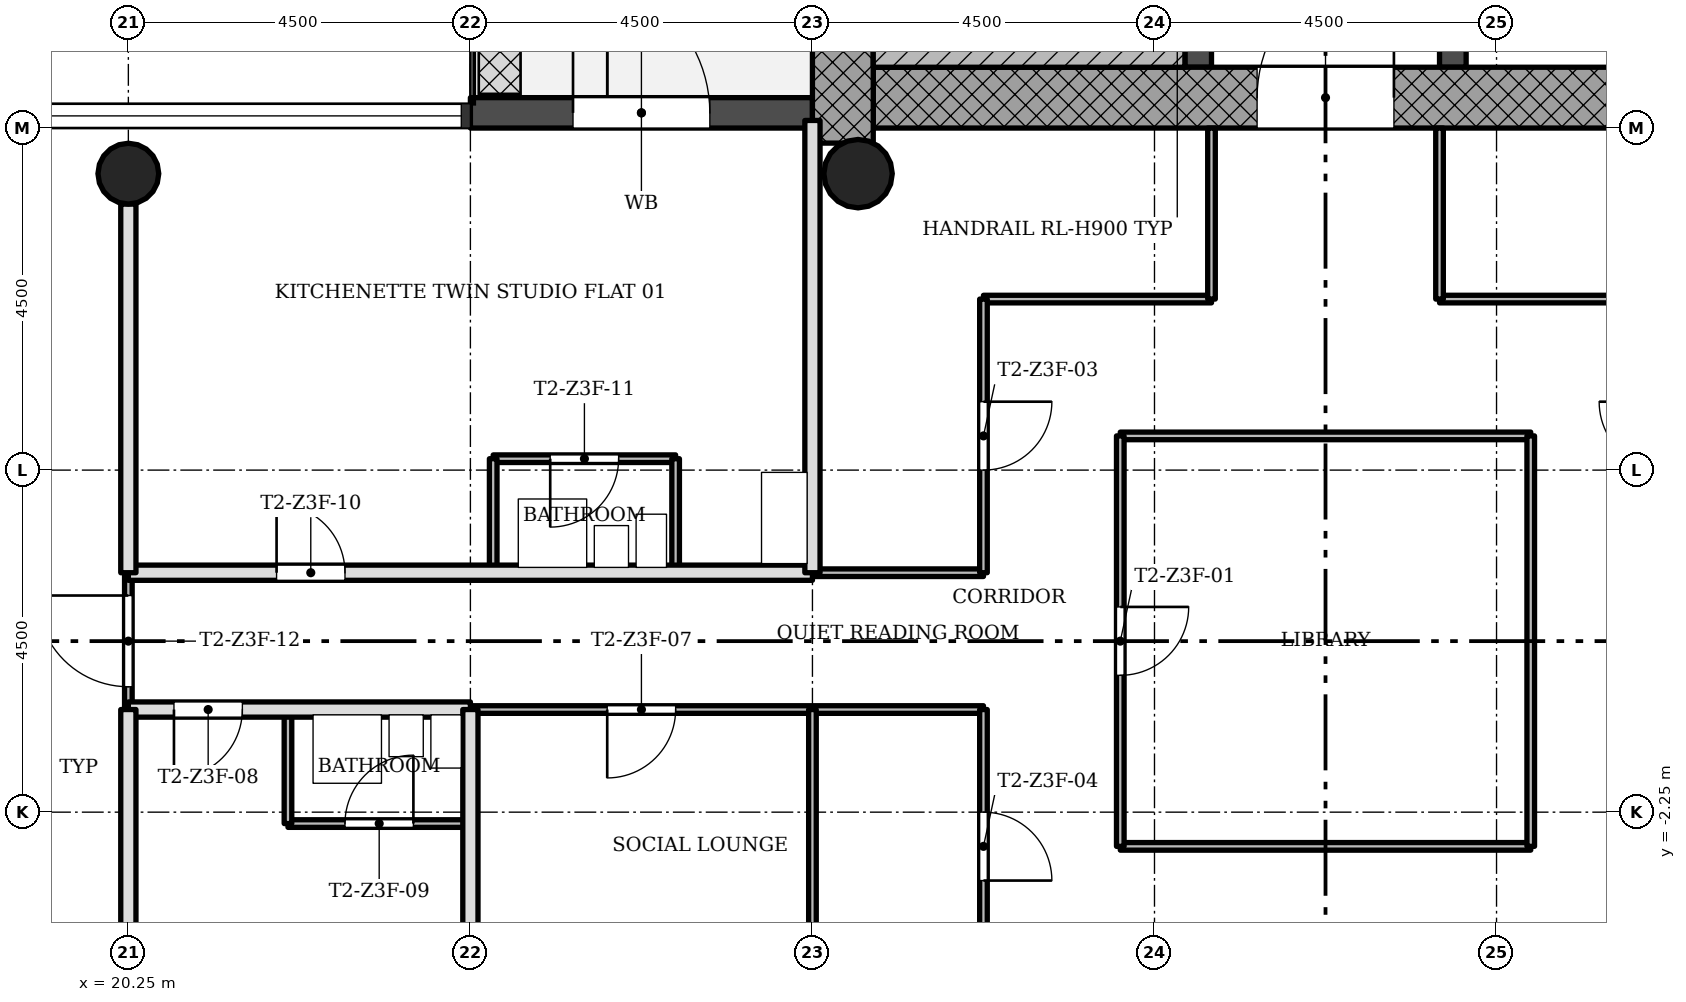
"""IFC4 building model, lengths in metres.
Left out: names, types, materials, properties, quantities, classifications, styles, units other than length and angle.
Written with IfcOpenShell. Run it as: python <this file> out.ifc"""

import sys

from ifc_helpers import new_model, si_unit, direction, frame, frame_2d, origin, origin_2d, place, context, subcontext, project, spatial, rectangle, hollow_circle, extrude, element, fill, save


model = new_model("IFC4")
c1 = context("Model", 3, precision=1e-05, world=origin(), true_north=direction((0.0, 1.0)))
c2 = subcontext(c1, "Body", "Model", "MODEL_VIEW")
j1 = project(units=[si_unit("LENGTHUNIT", "METRE"), si_unit("PLANEANGLEUNIT", "RADIAN")], contexts=[c1])
p1 = place(None, origin())
s1 = spatial("IfcSite", under=j1, at=p1, CompositionType="ELEMENT")
p2 = place(p1, origin())
s2 = spatial("IfcBuilding", under=s1, at=p2, CompositionType="ELEMENT")
p3 = place(p2, frame((0.0, 0.0, 167.7)))
s3 = spatial("IfcBuildingStorey", under=s2, at=p3, CompositionType="ELEMENT", Elevation=167.7)
p4 = place(p3, frame((30.05, 7.15, 0.0), z_axis=(0.0, 0.0, 1.0), x_axis=(1.0, 0.0, 0.0)))
e1 = element("IfcWall", 1, at=p4, inside=s3, PredefinedType="SHEAR", context=c2, shape_type="SweptSolid", body=[
    extrude(rectangle(XDim=12.7, YDim=0.8, at=frame_2d((6.35, 0.0))), origin(), (0.0, 0.0, 1.0), 3.4),
])
p5 = place(p4, frame((5.05, 0.0, 0.0)))
e2 = element("IfcOpeningElement", 2, at=p5, cuts=e1, PredefinedType="OPENING", context=c2, shape_type="SweptSolid", body=[
    extrude(rectangle(XDim=1.8, YDim=2.1, at=frame_2d((0.9, 1.05))), frame((0.0, 0.41, 0.0), z_axis=(0.0, -1.0, 0.0), x_axis=(1.0, 0.0, 0.0)), (0.0, 0.0, 1.0), 0.82),
])
p6 = place(p3, frame((29.65, 15.348, 0.0), z_axis=(0.0, 0.0, 1.0), x_axis=(0.0, -1.0, 0.0)))
e3 = element("IfcWall", 3, at=p6, inside=s3, PredefinedType="SHEAR", context=c2, shape_type="SweptSolid", body=[
    extrude(rectangle(XDim=8.796, YDim=0.8, at=frame_2d((4.398, 0.0))), origin(), (0.0, 0.0, 1.0), 3.4),
])
p7 = place(p3, frame((34.325, 7.55, 0.0), z_axis=(0.0, 0.0, 1.0), x_axis=(0.0, 1.0, 0.0)))
e4 = element("IfcWall", 4, at=p7, inside=s3, PredefinedType="SHEAR", context=c2, shape_type="SweptSolid", body=[
    extrude(rectangle(XDim=7.4, YDim=0.35, at=frame_2d((3.7, 0.0))), origin(), (0.0, 0.0, 1.0), 3.4),
])
p8 = place(p7, frame((0.85, 0.0, 0.0)))
e5 = element("IfcOpeningElement", 5, at=p8, cuts=e4, PredefinedType="OPENING", context=c2, shape_type="SweptSolid", body=[
    extrude(rectangle(XDim=0.9, YDim=2.1, at=frame_2d((0.45, 1.05))), frame((0.0, 0.185, 0.0), z_axis=(0.0, -1.0, 0.0), x_axis=(1.0, 0.0, 0.0)), (0.0, 0.0, 1.0), 0.37),
])
p9 = place(p3, frame((37.675, 7.55, 0.0), z_axis=(0.0, 0.0, 1.0), x_axis=(0.0, 1.0, 0.0)))
e6 = element("IfcWall", 6, at=p9, inside=s3, PredefinedType="SHEAR", context=c2, shape_type="SweptSolid", body=[
    extrude(rectangle(XDim=7.4, YDim=0.35, at=frame_2d((3.7, 0.0))), origin(), (0.0, 0.0, 1.0), 3.4),
])
p10 = place(p9, frame((0.95, 0.0, 0.0)))
e7 = element("IfcOpeningElement", 7, at=p10, cuts=e6, PredefinedType="OPENING", context=c2, shape_type="SweptSolid", body=[
    extrude(rectangle(XDim=1.1, YDim=2.1, at=frame_2d((0.55, 1.05))), frame((0.0, 0.185, 0.0), z_axis=(0.0, -1.0, 0.0), x_axis=(1.0, 0.0, 0.0)), (0.0, 0.0, 1.0), 0.37),
])
p11 = place(p9, frame((3.15, 0.0, 0.0)))
e8 = element("IfcOpeningElement", 8, at=p11, cuts=e6, PredefinedType="OPENING", context=c2, shape_type="SweptSolid", body=[
    extrude(rectangle(XDim=1.1, YDim=2.1, at=frame_2d((0.55, 1.05))), frame((0.0, 0.185, 0.0), z_axis=(0.0, -1.0, 0.0), x_axis=(1.0, 0.0, 0.0)), (0.0, 0.0, 1.0), 0.37),
])
p12 = place(p9, frame((5.35, 0.0, 0.0)))
e9 = element("IfcOpeningElement", 9, at=p12, cuts=e6, PredefinedType="OPENING", context=c2, shape_type="SweptSolid", body=[
    extrude(rectangle(XDim=1.1, YDim=2.1, at=frame_2d((0.55, 1.05))), frame((0.0, 0.185, 0.0), z_axis=(0.0, -1.0, 0.0), x_axis=(1.0, 0.0, 0.0)), (0.0, 0.0, 1.0), 0.37),
])
p13 = place(p3, frame((20.25, 6.15, 0.0), z_axis=(0.0, 0.0, 1.0), x_axis=(1.0, 0.0, 0.0)))
e10 = element("IfcColumn", 10, at=p13, inside=s3, PredefinedType="COLUMN", context=c2, shape_type="SweptSolid", body=[
    extrude(hollow_circle(Radius=0.4, WallThickness=0.028, at=origin_2d()), origin(), (0.0, 0.0, 1.0), 3.4),
])
p14 = place(p3, frame((29.85, 6.15, 0.0), z_axis=(0.0, 0.0, 1.0), x_axis=(1.0, 0.0, 0.0)))
e11 = element("IfcColumn", 11, at=p14, inside=s3, PredefinedType="COLUMN", context=c2, shape_type="SweptSolid", body=[
    extrude(hollow_circle(Radius=0.45, WallThickness=0.032, at=origin_2d()), origin(), (0.0, 0.0, 1.0), 3.4),
])
p15 = place(p3, frame((29.25, 6.95, -0.02), z_axis=(0.0, 0.0, 1.0), x_axis=(-1.0, 0.0, 0.0)))
e12 = element("IfcWall", 12, at=p15, inside=s3, PredefinedType="STANDARD", context=c2, shape_type="SweptSolid", body=[
    extrude(rectangle(XDim=4.5, YDim=0.4, at=frame_2d((2.25, 0.0))), origin(), (0.0, 0.0, 1.0), 3.12),
])
p16 = place(p15, frame((1.35, 0.0, 0.02)))
e13 = element("IfcOpeningElement", 13, at=p16, cuts=e12, PredefinedType="OPENING", context=c2, shape_type="SweptSolid", body=[
    extrude(rectangle(XDim=1.8, YDim=2.1, at=frame_2d((0.9, 1.05))), frame((0.0, 0.21, 0.0), z_axis=(0.0, -1.0, 0.0), x_axis=(1.0, 0.0, 0.0)), (0.0, 0.0, 1.0), 0.42),
])
p17 = place(p3, frame((38.7, -2.7, 0.0), z_axis=(0.0, 0.0, 1.0), x_axis=(-1.0, 0.0, 0.0)))
e14 = element("IfcWall", 14, at=p17, inside=s3, PredefinedType="PARTITIONING", context=c2, shape_type="SweptSolid", body=[
    extrude(rectangle(XDim=5.4, YDim=0.1, at=frame_2d((2.7, 0.0))), origin(), (0.0, 0.0, 1.0), 3.0),
])
p18 = place(p3, frame((24.75, -2.4, 0.0), z_axis=(0.0, 0.0, 1.0), x_axis=(-1.0, 0.0, 0.0)))
e15 = element("IfcWall", 15, at=p18, inside=s3, PredefinedType="PARTITIONING", context=c2, shape_type="SweptSolid", body=[
    extrude(rectangle(XDim=2.4, YDim=0.1, at=frame_2d((1.2, 0.0))), origin(), (0.0, 0.0, 1.0), 3.0),
])
p19 = place(p18, frame((0.75, 0.0, 0.0)))
e16 = element("IfcOpeningElement", 16, at=p19, cuts=e15, PredefinedType="OPENING", context=c2, shape_type="SweptSolid", body=[
    extrude(rectangle(XDim=0.9, YDim=2.1, at=frame_2d((0.45, 1.05))), frame((0.0, 0.06, 0.0), z_axis=(0.0, -1.0, 0.0), x_axis=(1.0, 0.0, 0.0)), (0.0, 0.0, 1.0), 0.12),
])
p20 = place(p3, frame((31.5, -0.9, 0.0), z_axis=(0.0, 0.0, 1.0), x_axis=(-1.0, 0.0, 0.0)))
e17 = element("IfcWall", 17, at=p20, inside=s3, PredefinedType="PARTITIONING", context=c2, shape_type="SweptSolid", body=[
    extrude(rectangle(XDim=6.75, YDim=0.1, at=frame_2d((3.375, 0.0))), origin(), (0.0, 0.0, 1.0), 3.0),
])
p21 = place(p20, frame((4.05, 0.0, 0.0)))
e18 = element("IfcOpeningElement", 18, at=p21, cuts=e17, PredefinedType="OPENING", context=c2, shape_type="SweptSolid", body=[
    extrude(rectangle(XDim=0.9, YDim=2.1, at=frame_2d((0.45, 1.05))), frame((0.0, 0.06, 0.0), z_axis=(0.0, -1.0, 0.0), x_axis=(1.0, 0.0, 0.0)), (0.0, 0.0, 1.0), 0.12),
])
p22 = place(p3, frame((24.75, -0.9, 0.0), z_axis=(0.0, 0.0, 1.0), x_axis=(-1.0, 0.0, 0.0)))
e19 = element("IfcWall", 19, at=p22, inside=s3, PredefinedType="SOLIDWALL", context=c2, shape_type="SweptSolid", body=[
    extrude(rectangle(XDim=4.5, YDim=0.2, at=frame_2d((2.25, 0.0))), origin(), (0.0, 0.0, 1.0), 3.0),
])
p23 = place(p22, frame((3.0, 0.0, 0.0)))
e20 = element("IfcOpeningElement", 20, at=p23, cuts=e19, PredefinedType="OPENING", context=c2, shape_type="SweptSolid", body=[
    extrude(rectangle(XDim=0.9, YDim=2.1, at=frame_2d((0.45, 1.05))), frame((0.0, 0.11, 0.0), z_axis=(0.0, -1.0, 0.0), x_axis=(1.0, 0.0, 0.0)), (0.0, 0.0, 1.0), 0.22),
])
p24 = place(p3, frame((31.5, 0.9, 0.0), z_axis=(0.0, 0.0, 1.0), x_axis=(-1.0, 0.0, 0.0)))
e21 = element("IfcWall", 21, at=p24, inside=s3, PredefinedType="PARTITIONING", context=c2, shape_type="SweptSolid", body=[
    extrude(rectangle(XDim=2.25, YDim=0.1, at=frame_2d((1.125, 0.0))), origin(), (0.0, 0.0, 1.0), 3.0),
])
p25 = place(p3, frame((29.25, 0.9, 0.0), z_axis=(0.0, 0.0, 1.0), x_axis=(-1.0, 0.0, 0.0)))
e22 = element("IfcWall", 22, at=p25, inside=s3, PredefinedType="SOLIDWALL", context=c2, shape_type="SweptSolid", body=[
    extrude(rectangle(XDim=9.0, YDim=0.2, at=frame_2d((4.5, 0.0))), origin(), (0.0, 0.0, 1.0), 3.0),
])
p26 = place(p25, frame((6.15, 0.0, 0.0)))
e23 = element("IfcOpeningElement", 23, at=p26, cuts=e22, PredefinedType="OPENING", context=c2, shape_type="SweptSolid", body=[
    extrude(rectangle(XDim=0.9, YDim=2.1, at=frame_2d((0.45, 1.05))), frame((0.0, 0.11, 0.0), z_axis=(0.0, -1.0, 0.0), x_axis=(1.0, 0.0, 0.0)), (0.0, 0.0, 1.0), 0.22),
])
p27 = place(p3, frame((27.45, 2.4, 0.0), z_axis=(0.0, 0.0, 1.0), x_axis=(-1.0, 0.0, 0.0)))
e24 = element("IfcWall", 24, at=p27, inside=s3, PredefinedType="PARTITIONING", context=c2, shape_type="SweptSolid", body=[
    extrude(rectangle(XDim=2.4, YDim=0.1, at=frame_2d((1.2, 0.0))), origin(), (0.0, 0.0, 1.0), 3.0),
])
p28 = place(p27, frame((0.75, 0.0, 0.0)))
e25 = element("IfcOpeningElement", 25, at=p28, cuts=e24, PredefinedType="OPENING", context=c2, shape_type="SweptSolid", body=[
    extrude(rectangle(XDim=0.9, YDim=2.1, at=frame_2d((0.45, 1.05))), frame((0.0, 0.06, 0.0), z_axis=(0.0, -1.0, 0.0), x_axis=(1.0, 0.0, 0.0)), (0.0, 0.0, 1.0), 0.12),
])
p29 = place(p3, frame((38.7, 2.7, 0.0), z_axis=(0.0, 0.0, 1.0), x_axis=(-1.0, 0.0, 0.0)))
e26 = element("IfcWall", 26, at=p29, inside=s3, PredefinedType="PARTITIONING", context=c2, shape_type="SweptSolid", body=[
    extrude(rectangle(XDim=5.4, YDim=0.1, at=frame_2d((2.7, 0.0))), origin(), (0.0, 0.0, 1.0), 3.0),
])
for number, where, z_axis, x_axis in (
    (27, (40.5, 4.5, 0.0), (0.0, 0.0, 1.0), (-1.0, 0.0, 0.0)),
    (28, (34.5, 4.5, 0.0), (0.0, 0.0, 1.0), (-1.0, 0.0, 0.0)),
):
    element("IfcWall", number, at=place(p3, frame(where, z_axis=z_axis, x_axis=x_axis)), inside=s3, PredefinedType="PARTITIONING", context=c2, shape_type="SweptSolid", body=[
        extrude(rectangle(XDim=3.0, YDim=0.1, at=frame_2d((1.5, 0.0))), origin(), (0.0, 0.0, 1.0), 3.0),
    ])
p30 = place(p3, frame((38.7, -2.7, 0.0), z_axis=(0.0, 0.0, 1.0), x_axis=(0.0, 1.0, 0.0)))
e29 = element("IfcWall", 29, at=p30, inside=s3, PredefinedType="PARTITIONING", context=c2, shape_type="SweptSolid", body=[
    extrude(rectangle(XDim=5.4, YDim=0.1, at=frame_2d((2.7, 0.0))), origin(), (0.0, 0.0, 1.0), 3.0),
])
for number, where, z_axis, x_axis in (
    (30, (37.5, 4.5, 0.0), (0.0, 0.0, 1.0), (0.0, 1.0, 0.0)),
    (31, (34.5, 4.5, 0.0), (0.0, 0.0, 1.0), (0.0, 1.0, 0.0)),
):
    element("IfcWall", number, at=place(p3, frame(where, z_axis=z_axis, x_axis=x_axis)), inside=s3, PredefinedType="PARTITIONING", context=c2, shape_type="SweptSolid", body=[
        extrude(rectangle(XDim=2.25, YDim=0.1, at=frame_2d((1.125, 0.0))), origin(), (0.0, 0.0, 1.0), 3.0),
    ])
p31 = place(p3, frame((33.3, -2.7, 0.0), z_axis=(0.0, 0.0, 1.0), x_axis=(0.0, 1.0, 0.0)))
e32 = element("IfcWall", 32, at=p31, inside=s3, PredefinedType="PARTITIONING", context=c2, shape_type="SweptSolid", body=[
    extrude(rectangle(XDim=5.4, YDim=0.1, at=frame_2d((2.7, 0.0))), origin(), (0.0, 0.0, 1.0), 3.0),
])
p32 = place(p31, frame((2.25, 0.0, 0.0)))
e33 = element("IfcOpeningElement", 33, at=p32, cuts=e32, PredefinedType="OPENING", context=c2, shape_type="SweptSolid", body=[
    extrude(rectangle(XDim=0.9, YDim=2.1, at=frame_2d((0.45, 1.05))), frame((0.0, 0.06, 0.0), z_axis=(0.0, -1.0, 0.0), x_axis=(1.0, 0.0, 0.0)), (0.0, 0.0, 1.0), 0.12),
])
p33 = place(p3, frame((31.5, -4.5, 0.0), z_axis=(0.0, 0.0, 1.0), x_axis=(0.0, 1.0, 0.0)))
e34 = element("IfcWall", 34, at=p33, inside=s3, PredefinedType="PARTITIONING", context=c2, shape_type="SweptSolid", body=[
    extrude(rectangle(XDim=3.6, YDim=0.1, at=frame_2d((1.8, 0.0))), origin(), (0.0, 0.0, 1.0), 3.0),
])
p34 = place(p33, frame((1.35, 0.0, 0.0)))
e35 = element("IfcOpeningElement", 35, at=p34, cuts=e34, PredefinedType="OPENING", context=c2, shape_type="SweptSolid", body=[
    extrude(rectangle(XDim=0.9, YDim=2.1, at=frame_2d((0.45, 1.05))), frame((0.0, 0.06, 0.0), z_axis=(0.0, -1.0, 0.0), x_axis=(1.0, 0.0, 0.0)), (0.0, 0.0, 1.0), 0.12),
])
p35 = place(p3, frame((31.5, 0.9, 0.0), z_axis=(0.0, 0.0, 1.0), x_axis=(0.0, 1.0, 0.0)))
e36 = element("IfcWall", 36, at=p35, inside=s3, PredefinedType="PARTITIONING", context=c2, shape_type="SweptSolid", body=[
    extrude(rectangle(XDim=3.6, YDim=0.1, at=frame_2d((1.8, 0.0))), origin(), (0.0, 0.0, 1.0), 3.0),
])
p36 = place(p35, frame((1.35, 0.0, 0.0)))
e37 = element("IfcOpeningElement", 37, at=p36, cuts=e36, PredefinedType="OPENING", context=c2, shape_type="SweptSolid", body=[
    extrude(rectangle(XDim=0.9, YDim=2.1, at=frame_2d((0.45, 1.05))), frame((0.0, 0.06, 0.0), z_axis=(0.0, -1.0, 0.0), x_axis=(1.0, 0.0, 0.0)), (0.0, 0.0, 1.0), 0.12),
])
p37 = place(p3, frame((29.25, -6.85, 0.0), z_axis=(0.0, 0.0, 1.0), x_axis=(0.0, 1.0, 0.0)))
e38 = element("IfcWall", 38, at=p37, inside=s3, PredefinedType="PARTITIONING", context=c2, shape_type="SweptSolid", body=[
    extrude(rectangle(XDim=5.95, YDim=0.1, at=frame_2d((2.975, 0.0))), origin(), (0.0, 0.0, 1.0), 3.0),
])
p38 = place(p3, frame((29.25, 0.9, 0.0), z_axis=(0.0, 0.0, 1.0), x_axis=(0.0, 1.0, 0.0)))
e39 = element("IfcWall", 39, at=p38, inside=s3, PredefinedType="SOLIDWALL", context=c2, shape_type="SweptSolid", body=[
    extrude(rectangle(XDim=5.95, YDim=0.2, at=frame_2d((2.975, 0.0))), origin(), (0.0, 0.0, 1.0), 3.0),
])
for number, where, z_axis, x_axis in (
    (40, (27.45, 0.9, 0.0), (0.0, 0.0, 1.0), (0.0, 1.0, 0.0)),
    (41, (25.05, 0.9, 0.0), (0.0, 0.0, 1.0), (0.0, 1.0, 0.0)),
):
    element("IfcWall", number, at=place(p3, frame(where, z_axis=z_axis, x_axis=x_axis)), inside=s3, PredefinedType="PARTITIONING", context=c2, shape_type="SweptSolid", body=[
        extrude(rectangle(XDim=1.5, YDim=0.1, at=frame_2d((0.75, 0.0))), origin(), (0.0, 0.0, 1.0), 3.0),
    ])
p39 = place(p3, frame((24.75, -6.85, 0.0), z_axis=(0.0, 0.0, 1.0), x_axis=(0.0, 1.0, 0.0)))
e42 = element("IfcWall", 42, at=p39, inside=s3, PredefinedType="SOLIDWALL", context=c2, shape_type="SweptSolid", body=[
    extrude(rectangle(XDim=5.95, YDim=0.2, at=frame_2d((2.975, 0.0))), origin(), (0.0, 0.0, 1.0), 3.0),
])
p40 = place(p3, frame((22.35, -2.4, 0.0), z_axis=(0.0, 0.0, 1.0), x_axis=(0.0, 1.0, 0.0)))
e43 = element("IfcWall", 43, at=p40, inside=s3, PredefinedType="PARTITIONING", context=c2, shape_type="SweptSolid", body=[
    extrude(rectangle(XDim=1.5, YDim=0.1, at=frame_2d((0.75, 0.0))), origin(), (0.0, 0.0, 1.0), 3.0),
])
p41 = place(p3, frame((20.25, -0.9, 0.0), z_axis=(0.0, 0.0, 1.0), x_axis=(0.0, 1.0, 0.0)))
e44 = element("IfcWall", 44, at=p41, inside=s3, PredefinedType="PARTITIONING", context=c2, shape_type="SweptSolid", body=[
    extrude(rectangle(XDim=1.8, YDim=0.1, at=frame_2d((0.9, 0.0))), origin(), (0.0, 0.0, 1.0), 3.0),
])
p42 = place(p41, frame((0.3, 0.0, 0.0)))
e45 = element("IfcOpeningElement", 45, at=p42, cuts=e44, PredefinedType="OPENING", context=c2, shape_type="SweptSolid", body=[
    extrude(rectangle(XDim=1.2, YDim=2.1, at=frame_2d((0.6, 1.05))), frame((0.0, 0.06, 0.0), z_axis=(0.0, -1.0, 0.0), x_axis=(1.0, 0.0, 0.0)), (0.0, 0.0, 1.0), 0.12),
])
for number, where, z_axis, x_axis in (
    (46, (20.25, -5.75, 0.0), (0.0, 0.0, 1.0), (0.0, 1.0, 0.0)),
    (47, (20.25, 0.9, 0.0), (0.0, 0.0, 1.0), (0.0, 1.0, 0.0)),
):
    element("IfcWall", number, at=place(p3, frame(where, z_axis=z_axis, x_axis=x_axis)), inside=s3, PredefinedType="SOLIDWALL", context=c2, shape_type="SweptSolid", body=[
        extrude(rectangle(XDim=4.85, YDim=0.2, at=frame_2d((2.425, 0.0))), origin(), (0.0, 0.0, 1.0), 3.0),
    ])
p43 = place(p3, frame((34.15, 7.75, 0.0), z_axis=(0.0, 0.0, 1.0), x_axis=(-1.0, 0.0, 0.0)))
e48 = element("IfcWall", 48, at=p43, inside=s3, PredefinedType="SHEAR", context=c2, shape_type="SweptSolid", body=[
    extrude(rectangle(XDim=4.1, YDim=0.4, at=frame_2d((2.05, 0.0))), origin(), (0.0, 0.0, 1.0), 3.4),
])
p44 = place(p16, origin())
e49 = element("IfcDoor", 49, at=p44, inside=s3, OperationType="SINGLE_SWING_RIGHT", PredefinedType="DOOR", context=c2, shape_type="SweptSolid", body=[
    extrude(rectangle(XDim=1.8, YDim=2.1, at=frame_2d((0.9, 1.05))), frame((0.0, 0.025, 0.0), z_axis=(0.0, -1.0, 0.0), x_axis=(1.0, 0.0, 0.0)), (0.0, 0.0, 1.0), 0.05),
])
fill(e13, e49)
p45 = place(p32, origin())
e50 = element("IfcDoor", 50, at=p45, inside=s3, OperationType="SINGLE_SWING_RIGHT", PredefinedType="DOOR", context=c2, shape_type="SweptSolid", body=[
    extrude(rectangle(XDim=0.9, YDim=2.1, at=frame_2d((0.45, 1.05))), frame((0.0, 0.025, 0.0), z_axis=(0.0, -1.0, 0.0), x_axis=(1.0, 0.0, 0.0)), (0.0, 0.0, 1.0), 0.05),
])
fill(e33, e50)
p46 = place(p36, origin())
e51 = element("IfcDoor", 51, at=p46, inside=s3, OperationType="SINGLE_SWING_RIGHT", PredefinedType="DOOR", context=c2, shape_type="SweptSolid", body=[
    extrude(rectangle(XDim=0.9, YDim=2.1, at=frame_2d((0.45, 1.05))), frame((0.0, 0.025, 0.0), z_axis=(0.0, -1.0, 0.0), x_axis=(1.0, 0.0, 0.0)), (0.0, 0.0, 1.0), 0.05),
])
fill(e37, e51)
p47 = place(p34, origin())
e52 = element("IfcDoor", 52, at=p47, inside=s3, OperationType="SINGLE_SWING_LEFT", PredefinedType="DOOR", context=c2, shape_type="SweptSolid", body=[
    extrude(rectangle(XDim=0.9, YDim=2.1, at=frame_2d((0.45, 1.05))), frame((0.0, 0.025, 0.0), z_axis=(0.0, -1.0, 0.0), x_axis=(1.0, 0.0, 0.0)), (0.0, 0.0, 1.0), 0.05),
])
fill(e35, e52)
p48 = place(p21, origin())
e53 = element("IfcDoor", 53, at=p48, inside=s3, OperationType="SINGLE_SWING_LEFT", PredefinedType="DOOR", context=c2, shape_type="SweptSolid", body=[
    extrude(rectangle(XDim=0.9, YDim=2.1, at=frame_2d((0.45, 1.05))), frame((0.0, 0.025, 0.0), z_axis=(0.0, -1.0, 0.0), x_axis=(1.0, 0.0, 0.0)), (0.0, 0.0, 1.0), 0.05),
])
fill(e18, e53)
p49 = place(p23, origin())
e54 = element("IfcDoor", 54, at=p49, inside=s3, OperationType="SINGLE_SWING_LEFT", PredefinedType="DOOR", context=c2, shape_type="SweptSolid", body=[
    extrude(rectangle(XDim=0.9, YDim=2.1, at=frame_2d((0.45, 1.05))), frame((0.0, 0.025, 0.0), z_axis=(0.0, -1.0, 0.0), x_axis=(1.0, 0.0, 0.0)), (0.0, 0.0, 1.0), 0.05),
])
fill(e20, e54)
p50 = place(p19, origin())
e55 = element("IfcDoor", 55, at=p50, inside=s3, OperationType="SINGLE_SWING_LEFT", PredefinedType="DOOR", context=c2, shape_type="SweptSolid", body=[
    extrude(rectangle(XDim=0.9, YDim=2.1, at=frame_2d((0.45, 1.05))), frame((0.0, 0.025, 0.0), z_axis=(0.0, -1.0, 0.0), x_axis=(1.0, 0.0, 0.0)), (0.0, 0.0, 1.0), 0.05),
])
fill(e16, e55)
p51 = place(p26, origin())
e56 = element("IfcDoor", 56, at=p51, inside=s3, OperationType="SINGLE_SWING_RIGHT", PredefinedType="DOOR", context=c2, shape_type="SweptSolid", body=[
    extrude(rectangle(XDim=0.9, YDim=2.1, at=frame_2d((0.45, 1.05))), frame((0.0, 0.025, 0.0), z_axis=(0.0, -1.0, 0.0), x_axis=(1.0, 0.0, 0.0)), (0.0, 0.0, 1.0), 0.05),
])
fill(e23, e56)
p52 = place(p28, origin())
e57 = element("IfcDoor", 57, at=p52, inside=s3, OperationType="SINGLE_SWING_LEFT", PredefinedType="DOOR", context=c2, shape_type="SweptSolid", body=[
    extrude(rectangle(XDim=0.9, YDim=2.1, at=frame_2d((0.45, 1.05))), frame((0.0, 0.025, 0.0), z_axis=(0.0, -1.0, 0.0), x_axis=(1.0, 0.0, 0.0)), (0.0, 0.0, 1.0), 0.05),
])
fill(e25, e57)
p53 = place(p42, origin())
e58 = element("IfcDoor", 58, at=p53, inside=s3, OperationType="SINGLE_SWING_LEFT", PredefinedType="DOOR", context=c2, shape_type="SweptSolid", body=[
    extrude(rectangle(XDim=1.2, YDim=2.1, at=frame_2d((0.6, 1.05))), frame((0.0, 0.025, 0.0), z_axis=(0.0, -1.0, 0.0), x_axis=(1.0, 0.0, 0.0)), (0.0, 0.0, 1.0), 0.05),
])
fill(e45, e58)
p54 = place(p5, origin())
e59 = element("IfcDoor", 59, at=p54, inside=s3, OperationType="SINGLE_SWING_LEFT", PredefinedType="DOOR", context=c2, shape_type="SweptSolid", body=[
    extrude(rectangle(XDim=1.8, YDim=2.1, at=frame_2d((0.9, 1.05))), frame((0.0, 0.025, 0.0), z_axis=(0.0, -1.0, 0.0), x_axis=(1.0, 0.0, 0.0)), (0.0, 0.0, 1.0), 0.05),
])
fill(e2, e59)
save(model, sys.argv[1])
